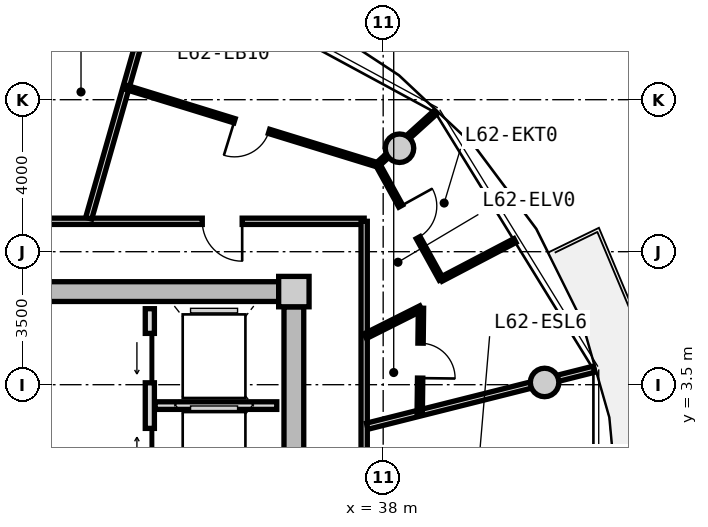
"""IFC4 building model, lengths in metres.
Left out: names, types, materials, properties, quantities, classifications, styles, units other than length and angle.
Written with IfcOpenShell. Run it as: python <this file> out.ifc"""

import sys

from ifc_helpers import new_model, si_unit, direction, frame, frame_2d, origin, origin_2d, place, context, subcontext, project, spatial, rectangle, circle, extrude, source, transform, mapped, element, fill, save


model = new_model("IFC4")
c1 = context("Model", 3, precision=1e-05, world=origin(), true_north=direction((0.0, 1.0)))
c2 = subcontext(c1, "Body", "Model", "MODEL_VIEW")
j1 = project(units=[si_unit("LENGTHUNIT", "METRE"), si_unit("PLANEANGLEUNIT", "RADIAN")], contexts=[c1])
p1 = place(None, origin())
s1 = spatial("IfcSite", under=j1, at=p1, CompositionType="ELEMENT")
p2 = place(p1, origin())
s2 = spatial("IfcBuilding", under=s1, at=p2, CompositionType="ELEMENT")
p3 = place(p2, frame((0.0, 0.0, 199.8)))
s3 = spatial("IfcBuildingStorey", under=s2, at=p3, CompositionType="ELEMENT", Elevation=199.8)
m1 = source(origin(), c2, "Body", "SweptSolid", [
    extrude(rectangle(XDim=0.8, YDim=0.8, at=origin_2d()), origin(), (0.0, 0.0, 1.0), 4.0),
])
p4 = place(p3, frame((35.65, 5.95, 0.0), z_axis=(0.0, 0.0, 1.0), x_axis=(1.0, 0.0, 0.0)))
e1 = element("IfcColumn", 1, at=p4, inside=s3, PredefinedType="COLUMN", context=c2, shape_type="MappedRepresentation", body=[
    mapped(m1, transform((0.0, 0.0, 0.0), x_axis=(1.0, 0.0, 0.0), y_axis=(0.0, 1.0, 0.0), z_axis=(0.0, 0.0, 1.0), scale=1.0)),
])
m2 = source(origin(), c2, "Body", "SweptSolid", [
    extrude(rectangle(XDim=14.5, YDim=0.52, at=frame_2d((7.25, 0.0))), origin(), (0.0, 0.0, 1.0), 3.71),
])
p5 = place(p3, frame((20.75, 5.95, 0.0), z_axis=(0.0, 0.0, 1.0), x_axis=(1.0, 0.0, 0.0)))
e2 = element("IfcWall", 2, at=p5, inside=s3, PredefinedType="SHEAR", context=c2, shape_type="MappedRepresentation", body=[
    mapped(m2, transform((0.0, 0.0, 0.0), x_axis=(1.0, 0.0, 0.0), y_axis=(0.0, 1.0, 0.0), z_axis=(0.0, 0.0, 1.0), scale=1.0)),
])
m3 = source(origin(), c2, "Body", "SweptSolid", [
    extrude(rectangle(XDim=11.1, YDim=0.52, at=frame_2d((5.55, 0.0))), origin(), (0.0, 0.0, 1.0), 3.71),
])
p6 = place(p3, frame((35.65, 5.55, 0.0), z_axis=(0.0, 0.0, 1.0), x_axis=(0.0, -1.0, 0.0)))
e3 = element("IfcWall", 3, at=p6, inside=s3, PredefinedType="SHEAR", context=c2, shape_type="MappedRepresentation", body=[
    mapped(m3, transform((0.0, 0.0, 0.0), x_axis=(1.0, 0.0, 0.0), y_axis=(0.0, 1.0, 0.0), z_axis=(0.0, 0.0, 1.0), scale=1.0)),
])
p7 = place(p6, frame((5.65, 0.0, 0.0)))
e4 = element("IfcOpeningElement", 4, at=p7, cuts=e3, PredefinedType="OPENING", context=c2, shape_type="SweptSolid", body=[
    extrude(rectangle(XDim=1.2, YDim=2.15, at=frame_2d((0.6, 1.075))), frame((0.0, 0.27, 0.0), z_axis=(0.0, -1.0, 0.0), x_axis=(1.0, 0.0, 0.0)), (0.0, 0.0, 1.0), 0.54),
])
m4 = source(origin(), c2, "Body", "SweptSolid", [
    extrude(circle(Radius=0.375, at=origin_2d()), origin(), (0.0, 0.0, 1.0), 4.0),
])
for number, where, z_axis, x_axis in (
    (5, (42.247, 3.559, 0.0), (0.0, 0.0, 1.0), (1.0, 0.0, 0.0)),
    (6, (38.43, 9.723, 0.0), (0.0, 0.0, 1.0), (1.0, 0.0, 0.0)),
):
    element("IfcColumn", number, at=place(p3, frame(where, z_axis=z_axis, x_axis=x_axis)), inside=s3, PredefinedType="COLUMN", context=c2, shape_type="MappedRepresentation", body=[
        mapped(m4, transform((0.0, 0.0, 0.0), x_axis=(1.0, 0.0, 0.0), y_axis=(0.0, 1.0, 0.0), z_axis=(0.0, 0.0, 1.0), scale=1.0)),
    ])
m5 = source(origin(), c2, "Body", "SweptSolid", [
    extrude(rectangle(XDim=5.0, YDim=0.24, at=frame_2d((2.5, 0.0))), origin(), (0.0, 0.0, 1.0), 3.695),
])
p8 = place(p3, frame((31.86, 0.5, 0.0), z_axis=(0.0, 0.0, 1.0), x_axis=(0.0, 1.0, 0.0)))
e7 = element("IfcWall", 7, at=p8, inside=s3, PredefinedType="PARTITIONING", context=c2, shape_type="MappedRepresentation", body=[
    mapped(m5, transform((0.0, 0.0, 0.0), x_axis=(1.0, 0.0, 0.0), y_axis=(0.0, 1.0, 0.0), z_axis=(0.0, 0.0, 1.0), scale=1.0)),
])
p9 = place(p8, frame((3.05, 0.0, 0.0)))
e8 = element("IfcOpeningElement", 8, at=p9, cuts=e7, PredefinedType="OPENING", context=c2, shape_type="SweptSolid", body=[
    extrude(rectangle(XDim=1.3, YDim=2.2, at=frame_2d((0.65, 1.1))), frame((0.0, 0.13, 0.0), z_axis=(0.0, -1.0, 0.0), x_axis=(1.0, 0.0, 0.0)), (0.0, 0.0, 1.0), 0.26),
])
p10 = place(p8, frame((0.55, 0.0, 0.0)))
e9 = element("IfcOpeningElement", 9, at=p10, cuts=e7, PredefinedType="OPENING", context=c2, shape_type="SweptSolid", body=[
    extrude(rectangle(XDim=1.3, YDim=2.2, at=frame_2d((0.65, 1.1))), frame((0.0, 0.13, 0.0), z_axis=(0.0, -1.0, 0.0), x_axis=(1.0, 0.0, 0.0)), (0.0, 0.0, 1.0), 0.26),
])
m6 = source(origin(), c2, "Body", "SweptSolid", [
    extrude(rectangle(XDim=3.2, YDim=0.2, at=frame_2d((1.6, 0.0))), origin(), (0.0, 0.0, 1.0), 3.695),
])
p11 = place(p3, frame((32.0, 2.95, 0.0), z_axis=(0.0, 0.0, 1.0), x_axis=(1.0, 0.0, 0.0)))
e10 = element("IfcWall", 10, at=p11, inside=s3, PredefinedType="PARTITIONING", context=c2, shape_type="MappedRepresentation", body=[
    mapped(m6, transform((0.0, 0.0, 0.0), x_axis=(1.0, 0.0, 0.0), y_axis=(0.0, 1.0, 0.0), z_axis=(0.0, 0.0, 1.0), scale=1.0)),
])
m7 = source(origin(), c2, "Body", "SweptSolid", [
    extrude(rectangle(XDim=8.58, YDim=0.165, at=frame_2d((4.29, 0.0))), origin(), (0.0, 0.0, 1.0), 3.695),
])
p12 = place(p3, frame((28.92, 7.8, 0.0), z_axis=(0.0, 0.0, 1.0), x_axis=(1.0, 0.0, 0.0)))
e11 = element("IfcWall", 11, at=p12, inside=s3, PredefinedType="PARTITIONING", context=c2, shape_type="MappedRepresentation", body=[
    mapped(m7, transform((0.0, 0.0, 0.0), x_axis=(1.0, 0.0, 0.0), y_axis=(0.0, 1.0, 0.0), z_axis=(0.0, 0.0, 1.0), scale=1.0)),
])
p13 = place(p12, frame((4.32, 0.0, 0.0)))
e12 = element("IfcOpeningElement", 12, at=p13, cuts=e11, PredefinedType="OPENING", context=c2, shape_type="SweptSolid", body=[
    extrude(rectangle(XDim=1.05, YDim=2.15, at=frame_2d((0.525, 1.075))), frame((0.0, 0.093, 0.0), z_axis=(0.0, -1.0, 0.0), x_axis=(1.0, 0.0, 0.0)), (0.0, 0.0, 1.0), 0.185),
])
m8 = source(origin(), c2, "Body", "SweptSolid", [
    extrude(rectangle(XDim=6.88, YDim=0.165, at=frame_2d((3.44, 0.0))), origin(), (0.0, 0.0, 1.0), 3.695),
])
p14 = place(p3, frame((37.5, 7.8, 0.0), z_axis=(0.0, 0.0, 1.0), x_axis=(0.0, -1.0, 0.0)))
e13 = element("IfcWall", 13, at=p14, inside=s3, PredefinedType="PARTITIONING", context=c2, shape_type="MappedRepresentation", body=[
    mapped(m8, transform((0.0, 0.0, 0.0), x_axis=(1.0, 0.0, 0.0), y_axis=(0.0, 1.0, 0.0), z_axis=(0.0, 0.0, 1.0), scale=1.0)),
])
m9 = source(origin(), c2, "Body", "SweptSolid", [
    extrude(rectangle(XDim=6.974, YDim=0.165, at=frame_2d((3.487, 0.0))), origin(), (0.0, 0.0, 1.0), 3.295),
])
p15 = place(p3, frame((30.251, 7.88, 0.0), z_axis=(0.0, 0.0, 1.0), x_axis=(0.274707256801, 0.961527910703, 0.0)))
e14 = element("IfcWall", 14, at=p15, inside=s3, PredefinedType="PARTITIONING", context=c2, shape_type="MappedRepresentation", body=[
    mapped(m9, transform((0.0, 0.0, 0.0), x_axis=(1.0, 0.0, 0.0), y_axis=(0.0, 1.0, 0.0), z_axis=(0.0, 0.0, 1.0), scale=1.0)),
])
m10 = source(origin(), c2, "Body", "SweptSolid", [
    extrude(rectangle(XDim=6.157, YDim=0.165, at=frame_2d((3.079, 0.0))), origin(), (0.0, 0.0, 1.0), 3.295),
])
p16 = place(p3, frame((37.58, 2.407, 0.0), z_axis=(0.0, 0.0, 1.0), x_axis=(0.969840867184, 0.243738984038, 0.0)))
e15 = element("IfcWall", 15, at=p16, inside=s3, PredefinedType="PARTITIONING", context=c2, shape_type="MappedRepresentation", body=[
    mapped(m10, transform((0.0, 0.0, 0.0), x_axis=(1.0, 0.0, 0.0), y_axis=(0.0, 1.0, 0.0), z_axis=(0.0, 0.0, 1.0), scale=1.0)),
])
m11 = source(origin(), c2, "Body", "SweptSolid", [
    extrude(rectangle(XDim=6.919, YDim=0.115, at=frame_2d((3.459, 0.0))), origin(), (0.0, 0.0, 1.0), 3.695),
])
p17 = place(p3, frame((37.849, 9.287, 0.0), z_axis=(0.0, 0.0, 1.0), x_axis=(-0.955678249072, 0.294413118341, 0.0)))
e16 = element("IfcWall", 16, at=p17, inside=s3, PredefinedType="PARTITIONING", context=c2, shape_type="MappedRepresentation", body=[
    mapped(m11, transform((0.0, 0.0, 0.0), x_axis=(1.0, 0.0, 0.0), y_axis=(0.0, 1.0, 0.0), z_axis=(0.0, 0.0, 1.0), scale=1.0)),
])
p18 = place(p17, frame((2.985, 0.0, 0.0)))
e17 = element("IfcOpeningElement", 17, at=p18, cuts=e16, PredefinedType="OPENING", context=c2, shape_type="SweptSolid", body=[
    extrude(rectangle(XDim=0.95, YDim=2.1, at=frame_2d((0.475, 1.05))), frame((0.0, 0.067, 0.0), z_axis=(0.0, -1.0, 0.0), x_axis=(1.0, 0.0, 0.0)), (0.0, 0.0, 1.0), 0.135),
])
m12 = source(origin(), c2, "Body", "SweptSolid", [
    extrude(rectangle(XDim=2.072, YDim=0.115, at=frame_2d((1.036, 0.0))), origin(), (0.0, 0.0, 1.0), 3.295),
])
p19 = place(p3, frame((37.849, 9.287, 0.0), z_axis=(0.0, 0.0, 1.0), x_axis=(0.741410125356, 0.671052178314, 0.0)))
e18 = element("IfcWall", 18, at=p19, inside=s3, PredefinedType="PARTITIONING", context=c2, shape_type="MappedRepresentation", body=[
    mapped(m12, transform((0.0, 0.0, 0.0), x_axis=(1.0, 0.0, 0.0), y_axis=(0.0, 1.0, 0.0), z_axis=(0.0, 0.0, 1.0), scale=1.0)),
])
m13 = source(origin(), c2, "Body", "SweptSolid", [
    extrude(rectangle(XDim=1.638, YDim=0.14, at=frame_2d((0.819, 0.0))), origin(), (0.0, 0.0, 1.0), 3.695),
])
p20 = place(p3, frame((37.53, 4.778, 0.0), z_axis=(0.0, 0.0, 1.0), x_axis=(0.893919977945, 0.448226586707, 0.0)))
e19 = element("IfcWall", 19, at=p20, inside=s3, PredefinedType="PARTITIONING", context=c2, shape_type="MappedRepresentation", body=[
    mapped(m13, transform((0.0, 0.0, 0.0), x_axis=(1.0, 0.0, 0.0), y_axis=(0.0, 1.0, 0.0), z_axis=(0.0, 0.0, 1.0), scale=1.0)),
])
m14 = source(origin(), c2, "Body", "SweptSolid", [
    extrude(rectangle(XDim=2.759, YDim=0.14, at=frame_2d((1.379, 0.0))), origin(), (0.0, 0.0, 1.0), 3.695),
])
p21 = place(p3, frame((38.995, 5.513, 0.0), z_axis=(0.0, 0.0, 1.0), x_axis=(-0.01194710728, -0.999928630767, 0.0)))
e20 = element("IfcWall", 20, at=p21, inside=s3, PredefinedType="PARTITIONING", context=c2, shape_type="MappedRepresentation", body=[
    mapped(m14, transform((0.0, 0.0, 0.0), x_axis=(1.0, 0.0, 0.0), y_axis=(0.0, 1.0, 0.0), z_axis=(0.0, 0.0, 1.0), scale=1.0)),
])
p22 = place(p21, frame((0.919, 0.0, 0.0)))
e21 = element("IfcOpeningElement", 21, at=p22, cuts=e20, PredefinedType="OPENING", context=c2, shape_type="SweptSolid", body=[
    extrude(rectangle(XDim=0.92, YDim=2.1, at=frame_2d((0.46, 1.05))), frame((0.0, 0.08, 0.0), z_axis=(0.0, -1.0, 0.0), x_axis=(1.0, 0.0, 0.0)), (0.0, 0.0, 1.0), 0.16),
])
m15 = source(origin(), c2, "Body", "SweptSolid", [
    extrude(rectangle(XDim=2.193, YDim=0.115, at=frame_2d((1.097, 0.0))), origin(), (0.0, 0.0, 1.0), 3.695),
])
p23 = place(p3, frame((39.525, 6.275, 0.0), z_axis=(0.0, 0.0, 1.0), x_axis=(0.885783595046, 0.464098505435, 0.0)))
e22 = element("IfcWall", 22, at=p23, inside=s3, PredefinedType="PARTITIONING", context=c2, shape_type="MappedRepresentation", body=[
    mapped(m15, transform((0.0, 0.0, 0.0), x_axis=(1.0, 0.0, 0.0), y_axis=(0.0, 1.0, 0.0), z_axis=(0.0, 0.0, 1.0), scale=1.0)),
])
m16 = source(origin(), c2, "Body", "SweptSolid", [
    extrude(rectangle(XDim=3.45, YDim=0.115, at=frame_2d((1.725, 0.0))), origin(), (0.0, 0.0, 1.0), 3.695),
])
p24 = place(p3, frame((39.525, 6.275, 0.0), z_axis=(0.0, 0.0, 1.0), x_axis=(-0.483659007882, 0.875256513312, 0.0)))
e23 = element("IfcWall", 23, at=p24, inside=s3, PredefinedType="PARTITIONING", context=c2, shape_type="MappedRepresentation", body=[
    mapped(m16, transform((0.0, 0.0, 0.0), x_axis=(1.0, 0.0, 0.0), y_axis=(0.0, 1.0, 0.0), z_axis=(0.0, 0.0, 1.0), scale=1.0)),
])
p25 = place(p24, frame((1.25, 0.0, 0.0)))
e24 = element("IfcOpeningElement", 24, at=p25, cuts=e23, PredefinedType="OPENING", context=c2, shape_type="SweptSolid", body=[
    extrude(rectangle(XDim=0.95, YDim=2.1, at=frame_2d((0.475, 1.05))), frame((0.0, 0.067, 0.0), z_axis=(0.0, -1.0, 0.0), x_axis=(1.0, 0.0, 0.0)), (0.0, 0.0, 1.0), 0.135),
])
m17 = source(origin(), c2, "Body", "SweptSolid", [
    extrude(rectangle(XDim=1.3, YDim=2.2, at=frame_2d((0.65, 1.1))), frame((0.0, 0.025, 0.0), z_axis=(0.0, -1.0, 0.0), x_axis=(1.0, 0.0, 0.0)), (0.0, 0.0, 1.0), 0.05),
])
p26 = place(p9, origin())
e25 = element("IfcDoor", 25, at=p26, inside=s3, OperationType="SLIDING_TO_LEFT", PredefinedType="DOOR", context=c2, shape_type="MappedRepresentation", body=[
    mapped(m17, transform((0.0, 0.0, 0.0), x_axis=(1.0, 0.0, 0.0), y_axis=(0.0, 1.0, 0.0), z_axis=(0.0, 0.0, 1.0), scale=1.0)),
])
fill(e8, e25)
p27 = place(p10, origin())
e26 = element("IfcDoor", 26, at=p27, inside=s3, OperationType="SLIDING_TO_RIGHT", PredefinedType="DOOR", context=c2, shape_type="MappedRepresentation", body=[
    mapped(m17, transform((0.0, 0.0, 0.0), x_axis=(1.0, 0.0, 0.0), y_axis=(0.0, 1.0, 0.0), z_axis=(0.0, 0.0, 1.0), scale=1.0)),
])
fill(e9, e26)
m18 = source(origin(), c2, "Body", "SweptSolid", [
    extrude(rectangle(XDim=1.05, YDim=2.15, at=frame_2d((0.525, 1.075))), frame((0.0, 0.025, 0.0), z_axis=(0.0, -1.0, 0.0), x_axis=(1.0, 0.0, 0.0)), (0.0, 0.0, 1.0), 0.05),
])
p28 = place(p13, frame((1.05, 0.0, 0.0), z_axis=(0.0, 0.0, 1.0), x_axis=(-1.0, 0.0, 0.0)))
e27 = element("IfcDoor", 27, at=p28, inside=s3, OperationType="SINGLE_SWING_LEFT", PredefinedType="DOOR", context=c2, shape_type="MappedRepresentation", body=[
    mapped(m18, transform((0.0, 0.0, 0.0), x_axis=(1.0, 0.0, 0.0), y_axis=(0.0, 1.0, 0.0), z_axis=(0.0, 0.0, 1.0), scale=1.0)),
])
fill(e12, e27)
m19 = source(origin(), c2, "Body", "SweptSolid", [
    extrude(rectangle(XDim=0.92, YDim=2.1, at=frame_2d((0.46, 1.05))), frame((0.0, 0.025, 0.0), z_axis=(0.0, -1.0, 0.0), x_axis=(1.0, 0.0, 0.0)), (0.0, 0.0, 1.0), 0.05),
])
p29 = place(p22, origin())
e28 = element("IfcDoor", 28, at=p29, inside=s3, OperationType="SINGLE_SWING_RIGHT", PredefinedType="DOOR", context=c2, shape_type="MappedRepresentation", body=[
    mapped(m19, transform((0.0, 0.0, 0.0), x_axis=(1.0, 0.0, 0.0), y_axis=(0.0, 1.0, 0.0), z_axis=(0.0, 0.0, 1.0), scale=1.0)),
])
fill(e21, e28)
m20 = source(origin(), c2, "Body", "SweptSolid", [
    extrude(rectangle(XDim=0.95, YDim=2.1, at=frame_2d((0.475, 1.05))), frame((0.0, 0.025, 0.0), z_axis=(0.0, -1.0, 0.0), x_axis=(1.0, 0.0, 0.0)), (0.0, 0.0, 1.0), 0.05),
])
p30 = place(p25, frame((0.95, 0.0, 0.0), z_axis=(0.0, 0.0, 1.0), x_axis=(-1.0, 0.0, 0.0)))
e29 = element("IfcDoor", 29, at=p30, inside=s3, OperationType="SINGLE_SWING_LEFT", PredefinedType="DOOR", context=c2, shape_type="MappedRepresentation", body=[
    mapped(m20, transform((0.0, 0.0, 0.0), x_axis=(1.0, 0.0, 0.0), y_axis=(0.0, 1.0, 0.0), z_axis=(0.0, 0.0, 1.0), scale=1.0)),
])
fill(e24, e29)
p31 = place(p18, origin())
e30 = element("IfcDoor", 30, at=p31, inside=s3, OperationType="SINGLE_SWING_RIGHT", PredefinedType="DOOR", context=c2, shape_type="MappedRepresentation", body=[
    mapped(m20, transform((0.0, 0.0, 0.0), x_axis=(1.0, 0.0, 0.0), y_axis=(0.0, 1.0, 0.0), z_axis=(0.0, 0.0, 1.0), scale=1.0)),
])
fill(e17, e30)
save(model, sys.argv[1])
